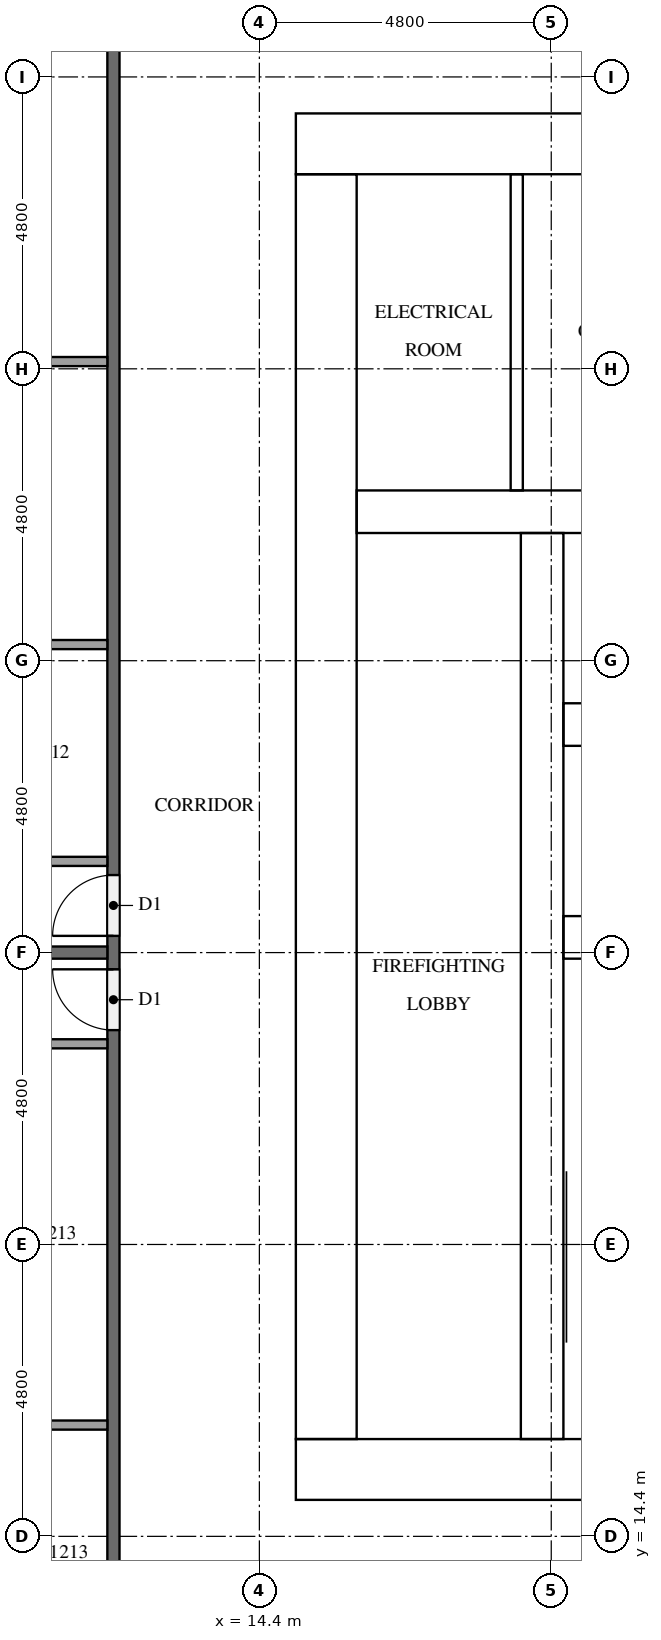
"""IFC4 building model, lengths in metres.
Left out: names, types, materials, properties, quantities, classifications, styles, units other than length and angle.
Written with IfcOpenShell. Run it as: python <this file> out.ifc"""

import sys

from ifc_helpers import new_model, si_unit, direction, frame, frame_2d, origin, place, context, subcontext, project, spatial, rectangle, extrude, element, fill, save


model = new_model("IFC4")
c1 = context("Model", 3, precision=1e-05, world=origin(), true_north=direction((0.0, 1.0)))
c2 = subcontext(c1, "Body", "Model", "MODEL_VIEW")
j1 = project(units=[si_unit("LENGTHUNIT", "METRE"), si_unit("PLANEANGLEUNIT", "RADIAN")], contexts=[c1])
p1 = place(None, origin())
s1 = spatial("IfcSite", under=j1, at=p1, CompositionType="ELEMENT")
p2 = place(p1, origin())
s2 = spatial("IfcBuilding", under=s1, at=p2, CompositionType="ELEMENT")
p3 = place(p2, frame((0.0, 0.0, 50.4)))
s3 = spatial("IfcBuildingStorey", under=s2, at=p3, CompositionType="ELEMENT", Elevation=50.4)
p4 = place(p3, frame((15.0, 15.5, 0.0), z_axis=(0.0, 0.0, 1.0), x_axis=(1.0, 0.0, 0.0)))
e1 = element("IfcWall", 1, at=p4, inside=s3, PredefinedType="SHEAR", context=c2, shape_type="SweptSolid", body=[
    extrude(rectangle(XDim=32.4, YDim=1.0, at=frame_2d((16.2, 0.0))), origin(), (0.0, 0.0, 1.0), 3.1),
])
p5 = place(p4, frame((15.3, 0.0, 0.0)))
e2 = element("IfcOpeningElement", 2, at=p5, cuts=e1, PredefinedType="OPENING", context=c2, shape_type="SweptSolid", body=[
    extrude(rectangle(XDim=1.8, YDim=2.1, at=frame_2d((0.9, 1.05))), frame((0.0, 0.51, 0.0), z_axis=(0.0, -1.0, 0.0), x_axis=(1.0, 0.0, 0.0)), (0.0, 0.0, 1.0), 1.02),
])
p6 = place(p3, frame((15.0, 37.3, 0.0), z_axis=(0.0, 0.0, 1.0), x_axis=(1.0, 0.0, 0.0)))
e3 = element("IfcWall", 3, at=p6, inside=s3, PredefinedType="SHEAR", context=c2, shape_type="SweptSolid", body=[
    extrude(rectangle(XDim=32.4, YDim=1.0, at=frame_2d((16.2, 0.0))), origin(), (0.0, 0.0, 1.0), 3.1),
])
p7 = place(p6, frame((15.3, 0.0, 0.0)))
e4 = element("IfcOpeningElement", 4, at=p7, cuts=e3, PredefinedType="OPENING", context=c2, shape_type="SweptSolid", body=[
    extrude(rectangle(XDim=1.8, YDim=2.1, at=frame_2d((0.9, 1.05))), frame((0.0, 0.51, 0.0), z_axis=(0.0, -1.0, 0.0), x_axis=(1.0, 0.0, 0.0)), (0.0, 0.0, 1.0), 1.02),
])
p8 = place(p6, frame((1.766, 0.0, 0.0)))
e5 = element("IfcOpeningElement", 5, at=p8, cuts=e3, PredefinedType="OPENING", context=c2, shape_type="SweptSolid", body=[
    extrude(rectangle(XDim=1.0, YDim=2.1, at=frame_2d((0.5, 1.05))), frame((0.0, 0.51, 0.0), z_axis=(0.0, -1.0, 0.0), x_axis=(1.0, 0.0, 0.0)), (0.0, 0.0, 1.0), 1.02),
])
p9 = place(p6, frame((5.241, 0.0, 0.0)))
e6 = element("IfcOpeningElement", 6, at=p9, cuts=e3, PredefinedType="OPENING", context=c2, shape_type="SweptSolid", body=[
    extrude(rectangle(XDim=1.0, YDim=2.1, at=frame_2d((0.5, 1.05))), frame((0.0, 0.51, 0.0), z_axis=(0.0, -1.0, 0.0), x_axis=(1.0, 0.0, 0.0)), (0.0, 0.0, 1.0), 1.02),
])
p10 = place(p3, frame((15.5, 16.0, 0.0), z_axis=(0.0, 0.0, 1.0), x_axis=(0.0, 1.0, 0.0)))
e7 = element("IfcWall", 7, at=p10, inside=s3, PredefinedType="SHEAR", context=c2, shape_type="SweptSolid", body=[
    extrude(rectangle(XDim=20.8, YDim=1.0, at=frame_2d((10.4, 0.0))), origin(), (0.0, 0.0, 1.0), 3.1),
])
p11 = place(p10, frame((4.76, 0.0, 0.0)))
e8 = element("IfcOpeningElement", 8, at=p11, cuts=e7, PredefinedType="OPENING", context=c2, shape_type="SweptSolid", body=[
    extrude(rectangle(XDim=1.2, YDim=2.1, at=frame_2d((0.6, 1.05))), frame((0.0, 0.51, 0.0), z_axis=(0.0, -1.0, 0.0), x_axis=(1.0, 0.0, 0.0)), (0.0, 0.0, 1.0), 1.02),
])
p12 = place(p3, frame((19.05, 16.0, 0.0), z_axis=(0.0, 0.0, 1.0), x_axis=(0.0, 1.0, 0.0)))
e9 = element("IfcWall", 9, at=p12, inside=s3, PredefinedType="SHEAR", context=c2, shape_type="SweptSolid", body=[
    extrude(rectangle(XDim=14.9, YDim=0.7, at=frame_2d((7.45, 0.0))), origin(), (0.0, 0.0, 1.0), 3.1),
])
p13 = place(p12, frame((9.45, 0.0, 0.0)))
e10 = element("IfcOpeningElement", 10, at=p13, cuts=e9, PredefinedType="OPENING", context=c2, shape_type="SweptSolid", body=[
    extrude(rectangle(XDim=1.1, YDim=2.1, at=frame_2d((0.55, 1.05))), frame((0.0, 0.36, 0.0), z_axis=(0.0, -1.0, 0.0), x_axis=(1.0, 0.0, 0.0)), (0.0, 0.0, 1.0), 0.72),
])
p14 = place(p12, frame((12.95, 0.0, 0.0)))
e11 = element("IfcOpeningElement", 11, at=p14, cuts=e9, PredefinedType="OPENING", context=c2, shape_type="SweptSolid", body=[
    extrude(rectangle(XDim=1.1, YDim=2.1, at=frame_2d((0.55, 1.05))), frame((0.0, 0.36, 0.0), z_axis=(0.0, -1.0, 0.0), x_axis=(1.0, 0.0, 0.0)), (0.0, 0.0, 1.0), 0.72),
])
p15 = place(p12, frame((0.2, 0.0, 0.0)))
e12 = element("IfcOpeningElement", 12, at=p15, cuts=e9, PredefinedType="OPENING", context=c2, shape_type="SweptSolid", body=[
    extrude(rectangle(XDim=1.2, YDim=2.1, at=frame_2d((0.6, 1.05))), frame((0.0, 0.36, 0.0), z_axis=(0.0, -1.0, 0.0), x_axis=(1.0, 0.0, 0.0)), (0.0, 0.0, 1.0), 0.72),
])
for number, where, z_axis, x_axis in (
    (13, (19.4, 24.25, 0.0), (0.0, 0.0, 1.0), (1.0, 0.0, 0.0)),
    (14, (19.4, 27.75, 0.0), (0.0, 0.0, 1.0), (1.0, 0.0, 0.0)),
):
    element("IfcWall", number, at=place(p3, frame(where, z_axis=z_axis, x_axis=x_axis)), inside=s3, PredefinedType="SHEAR", context=c2, shape_type="SweptSolid", body=[
        extrude(rectangle(XDim=3.35, YDim=0.7, at=frame_2d((1.675, 0.0))), origin(), (0.0, 0.0, 1.0), 3.1),
    ])
p16 = place(p3, frame((16.0, 31.25, 0.0), z_axis=(0.0, 0.0, 1.0), x_axis=(1.0, 0.0, 0.0)))
e15 = element("IfcWall", 15, at=p16, inside=s3, PredefinedType="SHEAR", context=c2, shape_type="SweptSolid", body=[
    extrude(rectangle(XDim=6.75, YDim=0.7, at=frame_2d((3.375, 0.0))), origin(), (0.0, 0.0, 1.0), 3.1),
])
p17 = place(p3, frame((18.633, 31.6, 0.0), z_axis=(0.0, 0.0, 1.0), x_axis=(0.0, 1.0, 0.0)))
e16 = element("IfcWall", 16, at=p17, inside=s3, PredefinedType="PARTITIONING", context=c2, shape_type="SweptSolid", body=[
    extrude(rectangle(XDim=5.2, YDim=0.2, at=frame_2d((2.6, 0.0))), origin(), (0.0, 0.0, 1.0), 3.1),
])
p18 = place(p3, frame((12.0, 12.1, 0.0), z_axis=(0.0, 0.0, 1.0), x_axis=(0.0, 1.0, 0.0)))
e17 = element("IfcWall", 17, at=p18, inside=s3, PredefinedType="PARTITIONING", context=c2, shape_type="SweptSolid", body=[
    extrude(rectangle(XDim=28.6, YDim=0.2, at=frame_2d((14.3, 0.0))), origin(), (0.0, 0.0, 1.0), 3.1),
])
p19 = place(p18, frame((12.175, 0.0, 0.0)))
e18 = element("IfcOpeningElement", 18, at=p19, cuts=e17, PredefinedType="OPENING", context=c2, shape_type="SweptSolid", body=[
    extrude(rectangle(XDim=1.0, YDim=2.1, at=frame_2d((0.5, 1.05))), frame((0.0, 0.11, 0.0), z_axis=(0.0, -1.0, 0.0), x_axis=(1.0, 0.0, 0.0)), (0.0, 0.0, 1.0), 0.22),
])
p20 = place(p18, frame((10.625, 0.0, 0.0)))
e19 = element("IfcOpeningElement", 19, at=p20, cuts=e17, PredefinedType="OPENING", context=c2, shape_type="SweptSolid", body=[
    extrude(rectangle(XDim=1.0, YDim=2.1, at=frame_2d((0.5, 1.05))), frame((0.0, 0.11, 0.0), z_axis=(0.0, -1.0, 0.0), x_axis=(1.0, 0.0, 0.0)), (0.0, 0.0, 1.0), 0.22),
])
p21 = place(p3, frame((0.45, 24.0, 0.0), z_axis=(0.0, 0.0, 1.0), x_axis=(1.0, 0.0, 0.0)))
e20 = element("IfcWall", 20, at=p21, inside=s3, PredefinedType="PARTITIONING", context=c2, shape_type="SweptSolid", body=[
    extrude(rectangle(XDim=11.45, YDim=0.2, at=frame_2d((5.725, 0.0))), origin(), (0.0, 0.0, 1.0), 3.1),
])
for number, where, z_axis, x_axis in (
    (21, (11.9, 29.065, 0.0), (0.0, 0.0, 1.0), (-1.0, 0.0, 0.0)),
    (22, (11.9, 33.719, 0.0), (0.0, 0.0, 1.0), (-1.0, 0.0, 0.0)),
):
    element("IfcWall", number, at=place(p3, frame(where, z_axis=z_axis, x_axis=x_axis)), inside=s3, PredefinedType="PARTITIONING", context=c2, shape_type="SweptSolid", body=[
        extrude(rectangle(XDim=4.325, YDim=0.15, at=frame_2d((2.163, 0.0))), origin(), (0.0, 0.0, 1.0), 3.1),
    ])
p22 = place(p3, frame((11.9, 25.5, 0.0), z_axis=(0.0, 0.0, 1.0), x_axis=(-1.0, 0.0, 0.0)))
e23 = element("IfcWall", 23, at=p22, inside=s3, PredefinedType="PARTITIONING", context=c2, shape_type="SweptSolid", body=[
    extrude(rectangle(XDim=4.475, YDim=0.15, at=frame_2d((2.237, 0.0))), origin(), (0.0, 0.0, 1.0), 3.1),
])
p23 = place(p3, frame((11.9, 16.23, 0.0), z_axis=(0.0, 0.0, 1.0), x_axis=(-1.0, 0.0, 0.0)))
e24 = element("IfcWall", 24, at=p23, inside=s3, PredefinedType="PARTITIONING", context=c2, shape_type="SweptSolid", body=[
    extrude(rectangle(XDim=3.125, YDim=0.15, at=frame_2d((1.562, 0.0))), origin(), (0.0, 0.0, 1.0), 3.1),
])
p24 = place(p3, frame((11.9, 22.5, 0.0), z_axis=(0.0, 0.0, 1.0), x_axis=(-1.0, 0.0, 0.0)))
e25 = element("IfcWall", 25, at=p24, inside=s3, PredefinedType="PARTITIONING", context=c2, shape_type="SweptSolid", body=[
    extrude(rectangle(XDim=3.275, YDim=0.15, at=frame_2d((1.637, 0.0))), origin(), (0.0, 0.0, 1.0), 3.1),
])
p25 = place(p13, origin())
e26 = element("IfcDoor", 26, at=p25, inside=s3, OperationType="DOUBLE_DOOR_SLIDING", PredefinedType="DOOR", context=c2, shape_type="SweptSolid", body=[
    extrude(rectangle(XDim=1.1, YDim=2.1, at=frame_2d((0.55, 1.05))), frame((0.0, 0.025, 0.0), z_axis=(0.0, -1.0, 0.0), x_axis=(1.0, 0.0, 0.0)), (0.0, 0.0, 1.0), 0.05),
])
fill(e10, e26)
p26 = place(p14, origin())
e27 = element("IfcDoor", 27, at=p26, inside=s3, OperationType="DOUBLE_DOOR_SLIDING", PredefinedType="DOOR", context=c2, shape_type="SweptSolid", body=[
    extrude(rectangle(XDim=1.1, YDim=2.1, at=frame_2d((0.55, 1.05))), frame((0.0, 0.025, 0.0), z_axis=(0.0, -1.0, 0.0), x_axis=(1.0, 0.0, 0.0)), (0.0, 0.0, 1.0), 0.05),
])
fill(e11, e27)
p27 = place(p15, frame((1.2, 0.0, 0.0), z_axis=(0.0, 0.0, 1.0), x_axis=(-1.0, 0.0, 0.0)))
e28 = element("IfcDoor", 28, at=p27, inside=s3, OperationType="SINGLE_SWING_RIGHT", PredefinedType="DOOR", context=c2, shape_type="SweptSolid", body=[
    extrude(rectangle(XDim=1.2, YDim=2.1, at=frame_2d((0.6, 1.05))), frame((0.0, 0.025, 0.0), z_axis=(0.0, -1.0, 0.0), x_axis=(1.0, 0.0, 0.0)), (0.0, 0.0, 1.0), 0.05),
])
fill(e12, e28)
p28 = place(p11, frame((1.2, 0.0, 0.0), z_axis=(0.0, 0.0, 1.0), x_axis=(-1.0, 0.0, 0.0)))
e29 = element("IfcDoor", 29, at=p28, inside=s3, OperationType="SINGLE_SWING_LEFT", PredefinedType="DOOR", context=c2, shape_type="SweptSolid", body=[
    extrude(rectangle(XDim=1.2, YDim=2.1, at=frame_2d((0.6, 1.05))), frame((0.0, 0.025, 0.0), z_axis=(0.0, -1.0, 0.0), x_axis=(1.0, 0.0, 0.0)), (0.0, 0.0, 1.0), 0.05),
])
fill(e8, e29)
p29 = place(p8, origin())
e30 = element("IfcDoor", 30, at=p29, inside=s3, OperationType="SINGLE_SWING_LEFT", PredefinedType="DOOR", context=c2, shape_type="SweptSolid", body=[
    extrude(rectangle(XDim=1.0, YDim=2.1, at=frame_2d((0.5, 1.05))), frame((0.0, 0.025, 0.0), z_axis=(0.0, -1.0, 0.0), x_axis=(1.0, 0.0, 0.0)), (0.0, 0.0, 1.0), 0.05),
])
fill(e5, e30)
p30 = place(p19, origin())
e31 = element("IfcDoor", 31, at=p30, inside=s3, OperationType="SINGLE_SWING_LEFT", PredefinedType="DOOR", context=c2, shape_type="SweptSolid", body=[
    extrude(rectangle(XDim=1.0, YDim=2.1, at=frame_2d((0.5, 1.05))), frame((0.0, 0.025, 0.0), z_axis=(0.0, -1.0, 0.0), x_axis=(1.0, 0.0, 0.0)), (0.0, 0.0, 1.0), 0.05),
])
fill(e18, e31)
p31 = place(p20, origin())
e32 = element("IfcDoor", 32, at=p31, inside=s3, OperationType="SINGLE_SWING_RIGHT", PredefinedType="DOOR", context=c2, shape_type="SweptSolid", body=[
    extrude(rectangle(XDim=1.0, YDim=2.1, at=frame_2d((0.5, 1.05))), frame((0.0, 0.025, 0.0), z_axis=(0.0, -1.0, 0.0), x_axis=(1.0, 0.0, 0.0)), (0.0, 0.0, 1.0), 0.05),
])
fill(e19, e32)
save(model, sys.argv[1])
